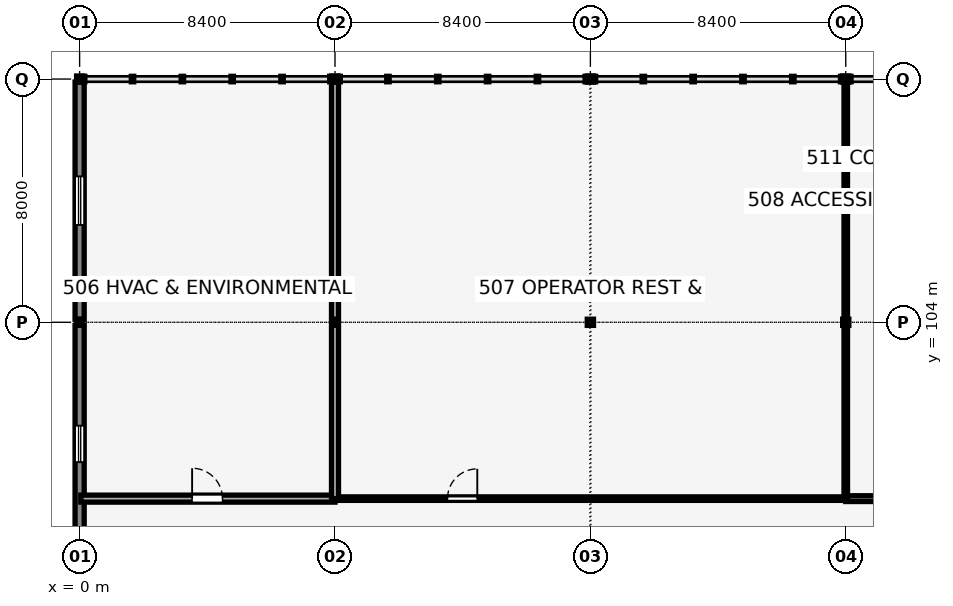
"""IFC4 building model, lengths in metres.
Left out: names, types, materials, properties, quantities, classifications, styles, units other than length and angle.
Written with IfcOpenShell. Run it as: python <this file> out.ifc"""

import sys

from ifc_helpers import new_model, si_unit, direction, frame, frame_2d, origin, origin_2d, place, context, subcontext, project, spatial, rectangle, hollow_rectangle, i_section, extrude, element, fill, save


model = new_model("IFC4")
c1 = context("Model", 3, precision=1e-05, world=origin(), true_north=direction((0.0, 1.0)))
c2 = subcontext(c1, "Body", "Model", "MODEL_VIEW")
j1 = project(units=[si_unit("LENGTHUNIT", "METRE"), si_unit("PLANEANGLEUNIT", "RADIAN")], contexts=[c1])
p1 = place(None, origin())
s1 = spatial("IfcSite", under=j1, at=p1, CompositionType="ELEMENT")
p2 = place(p1, origin())
s2 = spatial("IfcBuilding", under=s1, at=p2, CompositionType="ELEMENT")
p3 = place(p2, frame((0.0, 0.0, 21.04)))
s3 = spatial("IfcBuildingStorey", under=s2, at=p3, CompositionType="ELEMENT", Elevation=21.04)
for number, where, z_axis, x_axis in (
    (1, (0.0, 104.0, 0.0), (0.0, 0.0, 1.0), (1.0, 0.0, 0.0)),
    (2, (0.0, 112.0, 0.0), (0.0, 0.0, 1.0), (1.0, 0.0, 0.0)),
):
    element("IfcColumn", number, at=place(p3, frame(where, z_axis=z_axis, x_axis=x_axis)), inside=s3, PredefinedType="COLUMN", context=c2, shape_type="SweptSolid", body=[
        extrude(hollow_rectangle(XDim=0.2, YDim=0.2, WallThickness=0.01, InnerFilletRadius=0.015, OuterFilletRadius=0.025, at=origin_2d()), origin(), (0.0, 0.0, 1.0), 3.92),
    ])
for number, where, z_axis, x_axis in (
    (3, (8.4, 104.0, 0.0), (0.0, 0.0, 1.0), (1.0, 0.0, 0.0)),
    (4, (8.4, 112.0, 0.0), (0.0, 0.0, 1.0), (1.0, 0.0, 0.0)),
):
    element("IfcColumn", number, at=place(p3, frame(where, z_axis=z_axis, x_axis=x_axis)), inside=s3, PredefinedType="COLUMN", context=c2, shape_type="SweptSolid", body=[
        extrude(i_section(OverallWidth=0.204, OverallDepth=0.203, WebThickness=0.007, FlangeThickness=0.011, FilletRadius=0.01, at=origin_2d()), origin(), (0.0, 0.0, 1.0), 4.82),
    ])
for number, where, z_axis, x_axis in (
    (5, (16.8, 104.0, 0.0), (0.0, 0.0, 1.0), (1.0, 0.0, 0.0)),
    (6, (16.8, 112.0, 0.0), (0.0, 0.0, 1.0), (1.0, 0.0, 0.0)),
):
    element("IfcColumn", number, at=place(p3, frame(where, z_axis=z_axis, x_axis=x_axis)), inside=s3, PredefinedType="COLUMN", context=c2, shape_type="SweptSolid", body=[
        extrude(i_section(OverallWidth=0.204, OverallDepth=0.203, WebThickness=0.007, FlangeThickness=0.011, FilletRadius=0.01, at=origin_2d()), origin(), (0.0, 0.0, 1.0), 5.72),
    ])
for number, where, z_axis, x_axis in (
    (7, (25.2, 104.0, 0.0), (0.0, 0.0, 1.0), (1.0, 0.0, 0.0)),
    (8, (25.2, 112.0, 0.0), (0.0, 0.0, 1.0), (1.0, 0.0, 0.0)),
):
    element("IfcColumn", number, at=place(p3, frame(where, z_axis=z_axis, x_axis=x_axis)), inside=s3, PredefinedType="COLUMN", context=c2, shape_type="SweptSolid", body=[
        extrude(i_section(OverallWidth=0.204, OverallDepth=0.203, WebThickness=0.007, FlangeThickness=0.011, FilletRadius=0.01, at=origin_2d()), origin(), (0.0, 0.0, 1.0), 4.82),
    ])
p4 = place(p3, frame((0.0, 96.1, 0.0), z_axis=(0.0, 0.0, 1.0), x_axis=(0.0, 1.0, 0.0)))
e9 = element("IfcWall", 9, at=p4, inside=s3, PredefinedType="SOLIDWALL", context=c2, shape_type="SweptSolid", body=[
    extrude(rectangle(XDim=7.8, YDim=0.3, at=frame_2d((3.9, 0.0))), origin(), (0.0, 0.0, 1.0), 3.62),
])
p5 = place(p4, frame((3.3, 0.0, 1.55), z_axis=(0.0, 0.0, 1.0), x_axis=(1.0, 0.0, 0.0)))
e10 = element("IfcOpeningElement", 10, at=p5, cuts=e9, PredefinedType="OPENING", context=c2, shape_type="SweptSolid", body=[
    extrude(rectangle(XDim=1.2, YDim=0.95, at=frame_2d((0.6, 0.475))), frame((0.0, 0.16, 0.0), z_axis=(0.0, -1.0, 0.0), x_axis=(1.0, 0.0, 0.0)), (0.0, 0.0, 1.0), 0.32),
])
p6 = place(p3, frame((0.0, 104.1, 0.0), z_axis=(0.0, 0.0, 1.0), x_axis=(0.0, 1.0, 0.0)))
e11 = element("IfcWall", 11, at=p6, inside=s3, PredefinedType="SOLIDWALL", context=c2, shape_type="SweptSolid", body=[
    extrude(rectangle(XDim=7.8, YDim=0.3, at=frame_2d((3.9, 0.0))), origin(), (0.0, 0.0, 1.0), 3.62),
])
p7 = place(p6, frame((3.1, 0.0, 0.9), z_axis=(0.0, 0.0, 1.0), x_axis=(1.0, 0.0, 0.0)))
e12 = element("IfcOpeningElement", 12, at=p7, cuts=e11, PredefinedType="OPENING", context=c2, shape_type="SweptSolid", body=[
    extrude(rectangle(XDim=1.6, YDim=1.2, at=frame_2d((0.8, 0.6))), frame((0.0, 0.16, 0.0), z_axis=(0.0, -1.0, 0.0), x_axis=(1.0, 0.0, 0.0)), (0.0, 0.0, 1.0), 0.32),
])
p8 = place(p3, frame((0.04, 98.2, 0.0), z_axis=(0.0, 0.0, 1.0), x_axis=(1.0, 0.0, 0.0)))
e13 = element("IfcWall", 13, at=p8, inside=s3, PredefinedType="PARTITIONING", context=c2, shape_type="SweptSolid", body=[
    extrude(rectangle(XDim=8.36, YDim=0.23, at=frame_2d((4.18, 0.0))), origin(), (0.0, 0.0, 1.0), 3.92),
])
p9 = place(p8, frame((3.66, 0.0, 0.0), z_axis=(0.0, 0.0, 1.0), x_axis=(1.0, 0.0, 0.0)))
e14 = element("IfcOpeningElement", 14, at=p9, cuts=e13, PredefinedType="OPENING", context=c2, shape_type="SweptSolid", body=[
    extrude(rectangle(XDim=1.0, YDim=2.15, at=frame_2d((0.5, 1.075))), frame((0.0, 0.125, 0.0), z_axis=(0.0, -1.0, 0.0), x_axis=(1.0, 0.0, 0.0)), (0.0, 0.0, 1.0), 0.25),
])
p10 = place(p3, frame((8.4, 98.2, 0.0), z_axis=(0.0, 0.0, 1.0), x_axis=(1.0, 0.0, 0.0)))
e15 = element("IfcWall", 15, at=p10, inside=s3, PredefinedType="PARTITIONING", context=c2, shape_type="SweptSolid", body=[
    extrude(rectangle(XDim=16.8, YDim=0.115, at=frame_2d((8.4, 0.0))), origin(), (0.0, 0.0, 1.0), 3.92),
])
p11 = place(p10, frame((3.7, 0.0, 0.0), z_axis=(0.0, 0.0, 1.0), x_axis=(1.0, 0.0, 0.0)))
e16 = element("IfcOpeningElement", 16, at=p11, cuts=e15, PredefinedType="OPENING", context=c2, shape_type="SweptSolid", body=[
    extrude(rectangle(XDim=0.98, YDim=2.15, at=frame_2d((0.49, 1.075))), frame((0.0, 0.067, 0.0), z_axis=(0.0, -1.0, 0.0), x_axis=(1.0, 0.0, 0.0)), (0.0, 0.0, 1.0), 0.135),
])
p12 = place(p3, frame((25.2, 98.2, 0.0), z_axis=(0.0, 0.0, 1.0), x_axis=(1.0, 0.0, 0.0)))
e17 = element("IfcWall", 17, at=p12, inside=s3, PredefinedType="PLUMBINGWALL", context=c2, shape_type="SweptSolid", body=[
    extrude(rectangle(XDim=3.6, YDim=0.19, at=frame_2d((1.8, 0.0))), origin(), (0.0, 0.0, 1.0), 3.92),
])
p13 = place(p12, frame((1.3, 0.0, 0.0), z_axis=(0.0, 0.0, 1.0), x_axis=(1.0, 0.0, 0.0)))
e18 = element("IfcOpeningElement", 18, at=p13, cuts=e17, PredefinedType="OPENING", context=c2, shape_type="SweptSolid", body=[
    extrude(rectangle(XDim=0.95, YDim=2.15, at=frame_2d((0.475, 1.075))), frame((0.0, 0.105, 0.0), z_axis=(0.0, -1.0, 0.0), x_axis=(1.0, 0.0, 0.0)), (0.0, 0.0, 1.0), 0.21),
])
p14 = place(p3, frame((8.4, 98.2, 0.0), z_axis=(0.0, 0.0, 1.0), x_axis=(0.0, 1.0, 0.0)))
e19 = element("IfcWall", 19, at=p14, inside=s3, PredefinedType="PARTITIONING", context=c2, shape_type="SweptSolid", body=[
    extrude(rectangle(XDim=5.708, YDim=0.23, at=frame_2d((2.854, 0.0))), origin(), (0.0, 0.0, 1.0), 3.92),
])
p15 = place(p3, frame((8.4, 104.092, 0.0), z_axis=(0.0, 0.0, 1.0), x_axis=(0.0, 1.0, 0.0)))
e20 = element("IfcWall", 20, at=p15, inside=s3, PredefinedType="PARTITIONING", context=c2, shape_type="SweptSolid", body=[
    extrude(rectangle(XDim=7.817, YDim=0.23, at=frame_2d((3.908, 0.0))), origin(), (0.0, 0.0, 1.0), 3.92),
])
p16 = place(p3, frame((25.2, 98.2, 0.0), z_axis=(0.0, 0.0, 1.0), x_axis=(0.0, 1.0, 0.0)))
e21 = element("IfcWall", 21, at=p16, inside=s3, PredefinedType="PARTITIONING", context=c2, shape_type="SweptSolid", body=[
    extrude(rectangle(XDim=5.708, YDim=0.115, at=frame_2d((2.854, 0.0))), origin(), (0.0, 0.0, 1.0), 3.92),
])
p17 = place(p3, frame((25.2, 104.092, 0.0), z_axis=(0.0, 0.0, 1.0), x_axis=(0.0, 1.0, 0.0)))
e22 = element("IfcWall", 22, at=p17, inside=s3, PredefinedType="PARTITIONING", context=c2, shape_type="SweptSolid", body=[
    extrude(rectangle(XDim=7.817, YDim=0.115, at=frame_2d((3.908, 0.0))), origin(), (0.0, 0.0, 1.0), 3.92),
])
p18 = place(p5, origin())
e23 = element("IfcWindow", 23, at=p18, inside=s3, PartitioningType="SINGLE_PANEL", PredefinedType="WINDOW", context=c2, shape_type="SweptSolid", body=[
    extrude(rectangle(XDim=1.2, YDim=0.95, at=frame_2d((0.6, 0.475))), frame((0.0, 0.03, 0.0), z_axis=(0.0, -1.0, 0.0), x_axis=(1.0, 0.0, 0.0)), (0.0, 0.0, 1.0), 0.06),
])
fill(e10, e23)
p19 = place(p7, origin())
e24 = element("IfcWindow", 24, at=p19, inside=s3, PartitioningType="DOUBLE_PANEL_VERTICAL", PredefinedType="WINDOW", context=c2, shape_type="SweptSolid", body=[
    extrude(rectangle(XDim=1.6, YDim=1.2, at=frame_2d((0.8, 0.6))), frame((0.0, 0.03, 0.0), z_axis=(0.0, -1.0, 0.0), x_axis=(1.0, 0.0, 0.0)), (0.0, 0.0, 1.0), 0.06),
])
fill(e12, e24)
p20 = place(p9, origin())
e25 = element("IfcDoor", 25, at=p20, inside=s3, OperationType="SINGLE_SWING_LEFT", PredefinedType="DOOR", context=c2, shape_type="SweptSolid", body=[
    extrude(rectangle(XDim=1.0, YDim=2.15, at=frame_2d((0.5, 1.075))), frame((0.0, 0.025, 0.0), z_axis=(0.0, -1.0, 0.0), x_axis=(1.0, 0.0, 0.0)), (0.0, 0.0, 1.0), 0.05),
])
fill(e14, e25)
p21 = place(p11, origin())
e26 = element("IfcDoor", 26, at=p21, inside=s3, OperationType="SINGLE_SWING_RIGHT", PredefinedType="DOOR", context=c2, shape_type="SweptSolid", body=[
    extrude(rectangle(XDim=0.98, YDim=2.15, at=frame_2d((0.49, 1.075))), frame((0.0, 0.025, 0.0), z_axis=(0.0, -1.0, 0.0), x_axis=(1.0, 0.0, 0.0)), (0.0, 0.0, 1.0), 0.05),
])
fill(e16, e26)
save(model, sys.argv[1])
